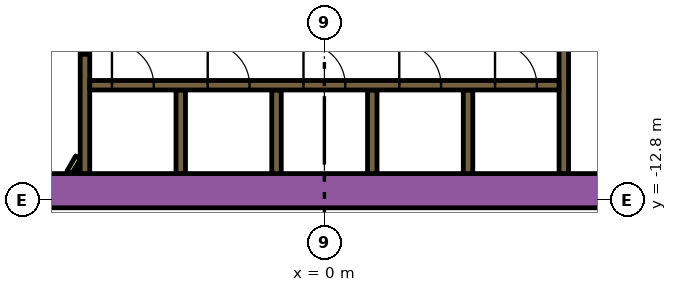
"""IFC4 building model, lengths in metres.
Left out: names, types, materials, properties, quantities, classifications, styles, units other than length and angle.
Written with IfcOpenShell. Run it as: python <this file> out.ifc"""

import sys

from ifc_helpers import new_model, si_unit, direction, frame, frame_2d, origin, place, context, subcontext, project, spatial, rectangle, extrude, element, fill, save


model = new_model("IFC4")
c1 = context("Model", 3, precision=1e-05, world=origin(), true_north=direction((0.0, 1.0)))
c2 = subcontext(c1, "Body", "Model", "MODEL_VIEW")
j1 = project(units=[si_unit("LENGTHUNIT", "METRE"), si_unit("PLANEANGLEUNIT", "RADIAN")], contexts=[c1])
p1 = place(None, origin())
s1 = spatial("IfcSite", under=j1, at=p1, CompositionType="ELEMENT")
p2 = place(p1, origin())
s2 = spatial("IfcBuilding", under=s1, at=p2, CompositionType="ELEMENT")
p3 = place(p2, frame((0.0, 0.0, 83.7)))
s3 = spatial("IfcBuildingStorey", under=s2, at=p3, CompositionType="ELEMENT", Elevation=83.7)
p4 = place(p3, frame((-12.019, -12.55, 0.0), z_axis=(0.0, 0.0, 1.0), x_axis=(1.0, 0.0, 0.0)))
e1 = element("IfcWall", 1, at=p4, inside=s3, PredefinedType="SOLIDWALL", context=c2, shape_type="SweptSolid", body=[
    extrude(rectangle(XDim=21.63, YDim=0.9, at=frame_2d((10.815, 0.0))), origin(), (0.0, 0.0, 1.0), 3.9),
])
p5 = place(p3, frame((12.84, -9.261, 0.0), z_axis=(0.0, 0.0, 1.0), x_axis=(-0.866013990052, 0.500019768644, 0.0)))
e2 = element("IfcWall", 2, at=p5, inside=s3, PredefinedType="SOLIDWALL", context=c2, shape_type="SweptSolid", body=[
    extrude(rectangle(XDim=6.8, YDim=0.25, at=frame_2d((3.4, 0.0))), origin(), (0.0, 0.0, 1.0), 3.9),
])
p6 = place(p3, frame((-12.84, -9.261, 0.0), z_axis=(0.0, 0.0, 1.0), x_axis=(0.866016039709, 0.500016218704, 0.0)))
e3 = element("IfcWall", 3, at=p6, inside=s3, PredefinedType="SOLIDWALL", context=c2, shape_type="SweptSolid", body=[
    extrude(rectangle(XDim=7.05, YDim=0.25, at=frame_2d((3.525, 0.0))), origin(), (0.0, 0.0, 1.0), 3.9),
])
p7 = place(p3, frame((-3.78, -12.1, 0.0), z_axis=(0.0, 0.0, 1.0), x_axis=(0.0, 1.0, 0.0)))
e4 = element("IfcWall", 4, at=p7, inside=s3, PredefinedType="SOLIDWALL", context=c2, shape_type="SweptSolid", body=[
    extrude(rectangle(XDim=2.2, YDim=0.25, at=frame_2d((1.1, 0.0))), origin(), (0.0, 0.0, 1.0), 3.9),
])
p8 = place(p3, frame((-6.3, -12.1, 0.0), z_axis=(0.0, 0.0, 1.0), x_axis=(0.0, 1.0, 0.0)))
e5 = element("IfcWall", 5, at=p8, inside=s3, PredefinedType="SOLIDWALL", context=c2, shape_type="SweptSolid", body=[
    extrude(rectangle(XDim=3.146, YDim=0.25, at=frame_2d((1.573, 0.0))), origin(), (0.0, 0.0, 1.0), 3.9),
])
p9 = place(p3, frame((6.3, -8.67, 0.0), z_axis=(0.0, 0.0, 1.0), x_axis=(0.0, -1.0, 0.0)))
e6 = element("IfcWall", 6, at=p9, inside=s3, PredefinedType="SOLIDWALL", context=c2, shape_type="SweptSolid", body=[
    extrude(rectangle(XDim=3.43, YDim=0.25, at=frame_2d((1.715, 0.0))), origin(), (0.0, 0.0, 1.0), 3.9),
])
for number, where, z_axis, x_axis in (
    (7, (3.78, -12.1, 0.0), (0.0, 0.0, 1.0), (0.0, 1.0, 0.0)),
    (8, (1.26, -12.1, 0.0), (0.0, 0.0, 1.0), (0.0, 1.0, 0.0)),
    (9, (-1.26, -12.1, 0.0), (0.0, 0.0, 1.0), (0.0, 1.0, 0.0)),
):
    element("IfcWall", number, at=place(p3, frame(where, z_axis=z_axis, x_axis=x_axis)), inside=s3, PredefinedType="SOLIDWALL", context=c2, shape_type="SweptSolid", body=[
        extrude(rectangle(XDim=2.2, YDim=0.25, at=frame_2d((1.1, 0.0))), origin(), (0.0, 0.0, 1.0), 3.9),
    ])
p10 = place(p3, frame((-6.708, -12.068, 0.0), z_axis=(0.0, 0.0, 1.0), x_axis=(0.500000789788, 0.8660249478, 0.0)))
e10 = element("IfcWall", 10, at=p10, inside=s3, PredefinedType="PARTITIONING", context=c2, shape_type="SweptSolid", body=[
    extrude(rectangle(XDim=0.456, YDim=0.15, at=frame_2d((0.228, 0.0))), origin(), (0.0, 0.0, 1.0), 2.75),
])
p11 = place(p3, frame((-6.534, -12.068, 0.0), z_axis=(0.0, 0.0, 1.0), x_axis=(0.500240224089, 0.865886665912, 0.0)))
e11 = element("IfcWall", 11, at=p11, inside=s3, PredefinedType="PARTITIONING", context=c2, shape_type="SweptSolid", body=[
    extrude(rectangle(XDim=0.109, YDim=0.15, at=frame_2d((0.054, 0.0))), origin(), (0.0, 0.0, 1.0), 2.75),
])
p12 = place(p3, frame((-6.175, -9.775, 0.0), z_axis=(0.0, 0.0, 1.0), x_axis=(1.0, 0.0, 0.0)))
e12 = element("IfcWall", 12, at=p12, inside=s3, PredefinedType="SOLIDWALL", context=c2, shape_type="SweptSolid", body=[
    extrude(rectangle(XDim=12.35, YDim=0.25, at=frame_2d((6.175, 0.0))), origin(), (0.0, 0.0, 1.0), 3.9),
])
p13 = place(p12, frame((0.585, 0.0, 0.0)))
e13 = element("IfcOpeningElement", 13, at=p13, cuts=e12, PredefinedType="OPENING", context=c2, shape_type="SweptSolid", body=[
    extrude(rectangle(XDim=1.1, YDim=2.1, at=frame_2d((0.55, 1.05))), frame((0.0, 0.135, 0.0), z_axis=(0.0, -1.0, 0.0), x_axis=(1.0, 0.0, 0.0)), (0.0, 0.0, 1.0), 0.27),
])
p14 = place(p12, frame((3.105, 0.0, 0.0)))
e14 = element("IfcOpeningElement", 14, at=p14, cuts=e12, PredefinedType="OPENING", context=c2, shape_type="SweptSolid", body=[
    extrude(rectangle(XDim=1.1, YDim=2.1, at=frame_2d((0.55, 1.05))), frame((0.0, 0.135, 0.0), z_axis=(0.0, -1.0, 0.0), x_axis=(1.0, 0.0, 0.0)), (0.0, 0.0, 1.0), 0.27),
])
p15 = place(p12, frame((5.625, 0.0, 0.0)))
e15 = element("IfcOpeningElement", 15, at=p15, cuts=e12, PredefinedType="OPENING", context=c2, shape_type="SweptSolid", body=[
    extrude(rectangle(XDim=1.1, YDim=2.1, at=frame_2d((0.55, 1.05))), frame((0.0, 0.135, 0.0), z_axis=(0.0, -1.0, 0.0), x_axis=(1.0, 0.0, 0.0)), (0.0, 0.0, 1.0), 0.27),
])
p16 = place(p12, frame((8.145, 0.0, 0.0)))
e16 = element("IfcOpeningElement", 16, at=p16, cuts=e12, PredefinedType="OPENING", context=c2, shape_type="SweptSolid", body=[
    extrude(rectangle(XDim=1.1, YDim=2.1, at=frame_2d((0.55, 1.05))), frame((0.0, 0.135, 0.0), z_axis=(0.0, -1.0, 0.0), x_axis=(1.0, 0.0, 0.0)), (0.0, 0.0, 1.0), 0.27),
])
p17 = place(p12, frame((10.665, 0.0, 0.0)))
e17 = element("IfcOpeningElement", 17, at=p17, cuts=e12, PredefinedType="OPENING", context=c2, shape_type="SweptSolid", body=[
    extrude(rectangle(XDim=1.1, YDim=2.1, at=frame_2d((0.55, 1.05))), frame((0.0, 0.135, 0.0), z_axis=(0.0, -1.0, 0.0), x_axis=(1.0, 0.0, 0.0)), (0.0, 0.0, 1.0), 0.27),
])
p18 = place(p3, frame((-6.3, -7.154, 0.0), z_axis=(0.0, 0.0, 1.0), x_axis=(0.0, -1.0, 0.0)))
e18 = element("IfcWall", 18, at=p18, inside=s3, PredefinedType="SOLIDWALL", context=c2, shape_type="SweptSolid", body=[
    extrude(rectangle(XDim=1.8, YDim=0.25, at=frame_2d((0.9, 0.0))), origin(), (0.0, 0.0, 1.0), 3.9),
])
p19 = place(p18, frame((0.45, 0.0, 0.0)))
e19 = element("IfcOpeningElement", 19, at=p19, cuts=e18, PredefinedType="OPENING", context=c2, shape_type="SweptSolid", body=[
    extrude(rectangle(XDim=0.9, YDim=2.1, at=frame_2d((0.45, 1.05))), frame((0.0, 0.135, 0.0), z_axis=(0.0, -1.0, 0.0), x_axis=(1.0, 0.0, 0.0)), (0.0, 0.0, 1.0), 0.27),
])
p20 = place(p13, origin())
e20 = element("IfcDoor", 20, at=p20, inside=s3, OperationType="DOUBLE_DOOR_SLIDING", PredefinedType="DOOR", context=c2, shape_type="SweptSolid", body=[
    extrude(rectangle(XDim=1.1, YDim=2.1, at=frame_2d((0.55, 1.05))), frame((0.0, 0.025, 0.0), z_axis=(0.0, -1.0, 0.0), x_axis=(1.0, 0.0, 0.0)), (0.0, 0.0, 1.0), 0.05),
])
fill(e13, e20)
p21 = place(p14, origin())
e21 = element("IfcDoor", 21, at=p21, inside=s3, OperationType="DOUBLE_DOOR_SLIDING", PredefinedType="DOOR", context=c2, shape_type="SweptSolid", body=[
    extrude(rectangle(XDim=1.1, YDim=2.1, at=frame_2d((0.55, 1.05))), frame((0.0, 0.025, 0.0), z_axis=(0.0, -1.0, 0.0), x_axis=(1.0, 0.0, 0.0)), (0.0, 0.0, 1.0), 0.05),
])
fill(e14, e21)
p22 = place(p15, origin())
e22 = element("IfcDoor", 22, at=p22, inside=s3, OperationType="DOUBLE_DOOR_SLIDING", PredefinedType="DOOR", context=c2, shape_type="SweptSolid", body=[
    extrude(rectangle(XDim=1.1, YDim=2.1, at=frame_2d((0.55, 1.05))), frame((0.0, 0.025, 0.0), z_axis=(0.0, -1.0, 0.0), x_axis=(1.0, 0.0, 0.0)), (0.0, 0.0, 1.0), 0.05),
])
fill(e15, e22)
p23 = place(p16, origin())
e23 = element("IfcDoor", 23, at=p23, inside=s3, OperationType="DOUBLE_DOOR_SLIDING", PredefinedType="DOOR", context=c2, shape_type="SweptSolid", body=[
    extrude(rectangle(XDim=1.1, YDim=2.1, at=frame_2d((0.55, 1.05))), frame((0.0, 0.025, 0.0), z_axis=(0.0, -1.0, 0.0), x_axis=(1.0, 0.0, 0.0)), (0.0, 0.0, 1.0), 0.05),
])
fill(e16, e23)
p24 = place(p17, origin())
e24 = element("IfcDoor", 24, at=p24, inside=s3, OperationType="DOUBLE_DOOR_SLIDING", PredefinedType="DOOR", context=c2, shape_type="SweptSolid", body=[
    extrude(rectangle(XDim=1.1, YDim=2.1, at=frame_2d((0.55, 1.05))), frame((0.0, 0.025, 0.0), z_axis=(0.0, -1.0, 0.0), x_axis=(1.0, 0.0, 0.0)), (0.0, 0.0, 1.0), 0.05),
])
fill(e17, e24)
save(model, sys.argv[1])
